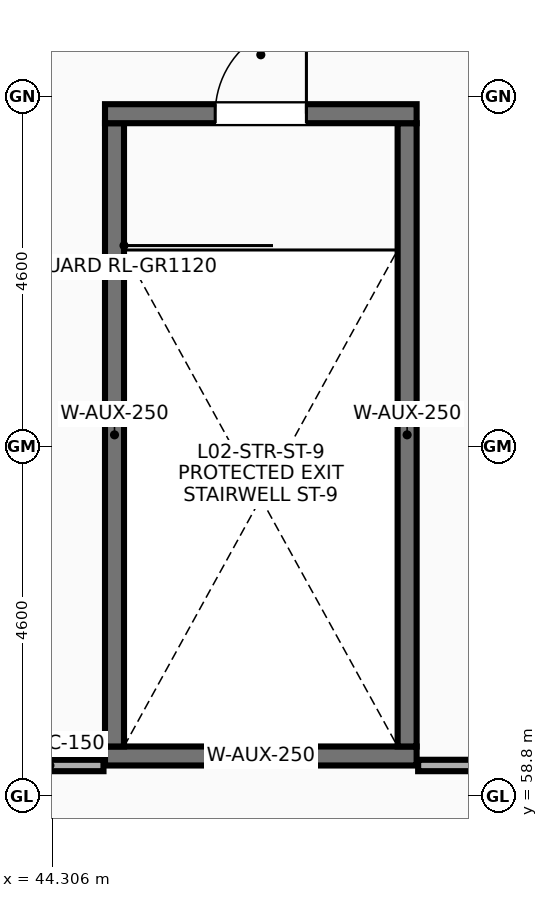
"""IFC4 building model, lengths in metres.
Left out: names, types, materials, properties, quantities, classifications, styles, units other than length and angle.
Written with IfcOpenShell. Run it as: python <this file> out.ifc"""

import sys

from ifc_helpers import new_model, si_unit, direction, frame, frame_2d, origin, place, context, subcontext, project, spatial, rectangle, extrude, element, fill, save


model = new_model("IFC4")
c1 = context("Model", 3, precision=1e-05, world=origin(), true_north=direction((0.0, 1.0)))
c2 = subcontext(c1, "Body", "Model", "MODEL_VIEW")
j1 = project(units=[si_unit("LENGTHUNIT", "METRE"), si_unit("PLANEANGLEUNIT", "RADIAN")], contexts=[c1])
p1 = place(None, origin())
s1 = spatial("IfcSite", under=j1, at=p1, CompositionType="ELEMENT")
p2 = place(p1, origin())
s2 = spatial("IfcBuilding", under=s1, at=p2, CompositionType="ELEMENT")
p3 = place(p2, frame((0.0, 0.0, 9.8)))
s3 = spatial("IfcBuildingStorey", under=s2, at=p3, CompositionType="ELEMENT", Elevation=9.8)
p4 = place(p3, frame((45.0, 59.325, 0.0), z_axis=(0.0, 0.0, 1.0), x_axis=(1.0, 0.0, 0.0)))
e1 = element("IfcWall", 1, at=p4, inside=s3, PredefinedType="SHEAR", context=c2, shape_type="SweptSolid", body=[
    extrude(rectangle(XDim=4.1, YDim=0.25, at=frame_2d((2.05, 0.0))), origin(), (0.0, 0.0, 1.0), 4.4),
])
for number, where, z_axis, x_axis in (
    (2, (45.125, 59.45, 0.0), (0.0, 0.0, 1.0), (0.0, 1.0, 0.0)),
    (3, (48.975, 59.45, 0.0), (0.0, 0.0, 1.0), (0.0, 1.0, 0.0)),
):
    element("IfcWall", number, at=place(p3, frame(where, z_axis=z_axis, x_axis=x_axis)), inside=s3, PredefinedType="SHEAR", context=c2, shape_type="SweptSolid", body=[
        extrude(rectangle(XDim=8.2, YDim=0.25, at=frame_2d((4.1, 0.0))), origin(), (0.0, 0.0, 1.0), 4.4),
    ])
p5 = place(p3, frame((45.0, 67.775, 0.0), z_axis=(0.0, 0.0, 1.0), x_axis=(1.0, 0.0, 0.0)))
e4 = element("IfcWall", 4, at=p5, inside=s3, PredefinedType="SHEAR", context=c2, shape_type="SweptSolid", body=[
    extrude(rectangle(XDim=4.1, YDim=0.25, at=frame_2d((2.05, 0.0))), origin(), (0.0, 0.0, 1.0), 4.4),
])
p6 = place(p5, frame((1.45, 0.0, 0.0)))
e5 = element("IfcOpeningElement", 5, at=p6, cuts=e4, PredefinedType="OPENING", context=c2, shape_type="SweptSolid", body=[
    extrude(rectangle(XDim=1.2, YDim=2.15, at=frame_2d((0.6, 1.075))), frame((0.0, 0.135, 0.0), z_axis=(0.0, -1.0, 0.0), x_axis=(1.0, 0.0, 0.0)), (0.0, 0.0, 1.0), 0.27),
])
p7 = place(p3, frame((49.12, 59.2, 0.0), z_axis=(0.0, 0.0, 1.0), x_axis=(1.0, 0.0, 0.0)))
e6 = element("IfcWall", 6, at=p7, inside=s3, PredefinedType="PARTITIONING", context=c2, shape_type="SweptSolid", body=[
    extrude(rectangle(XDim=15.26, YDim=0.15, at=frame_2d((7.63, 0.0))), origin(), (0.0, 0.0, 1.0), 4.1),
])
p8 = place(p3, frame((43.57, 59.2, 0.0), z_axis=(0.0, 0.0, 1.0), x_axis=(1.0, 0.0, 0.0)))
e7 = element("IfcWall", 7, at=p8, inside=s3, PredefinedType="PARTITIONING", context=c2, shape_type="SweptSolid", body=[
    extrude(rectangle(XDim=1.41, YDim=0.15, at=frame_2d((0.705, 0.0))), origin(), (0.0, 0.0, 1.0), 4.1),
])
p9 = place(p6, origin())
e8 = element("IfcDoor", 8, at=p9, inside=s3, OperationType="SINGLE_SWING_RIGHT", PredefinedType="DOOR", context=c2, shape_type="SweptSolid", body=[
    extrude(rectangle(XDim=1.2, YDim=2.15, at=frame_2d((0.6, 1.075))), frame((0.0, 0.025, 0.0), z_axis=(0.0, -1.0, 0.0), x_axis=(1.0, 0.0, 0.0)), (0.0, 0.0, 1.0), 0.05),
])
fill(e5, e8)
save(model, sys.argv[1])
